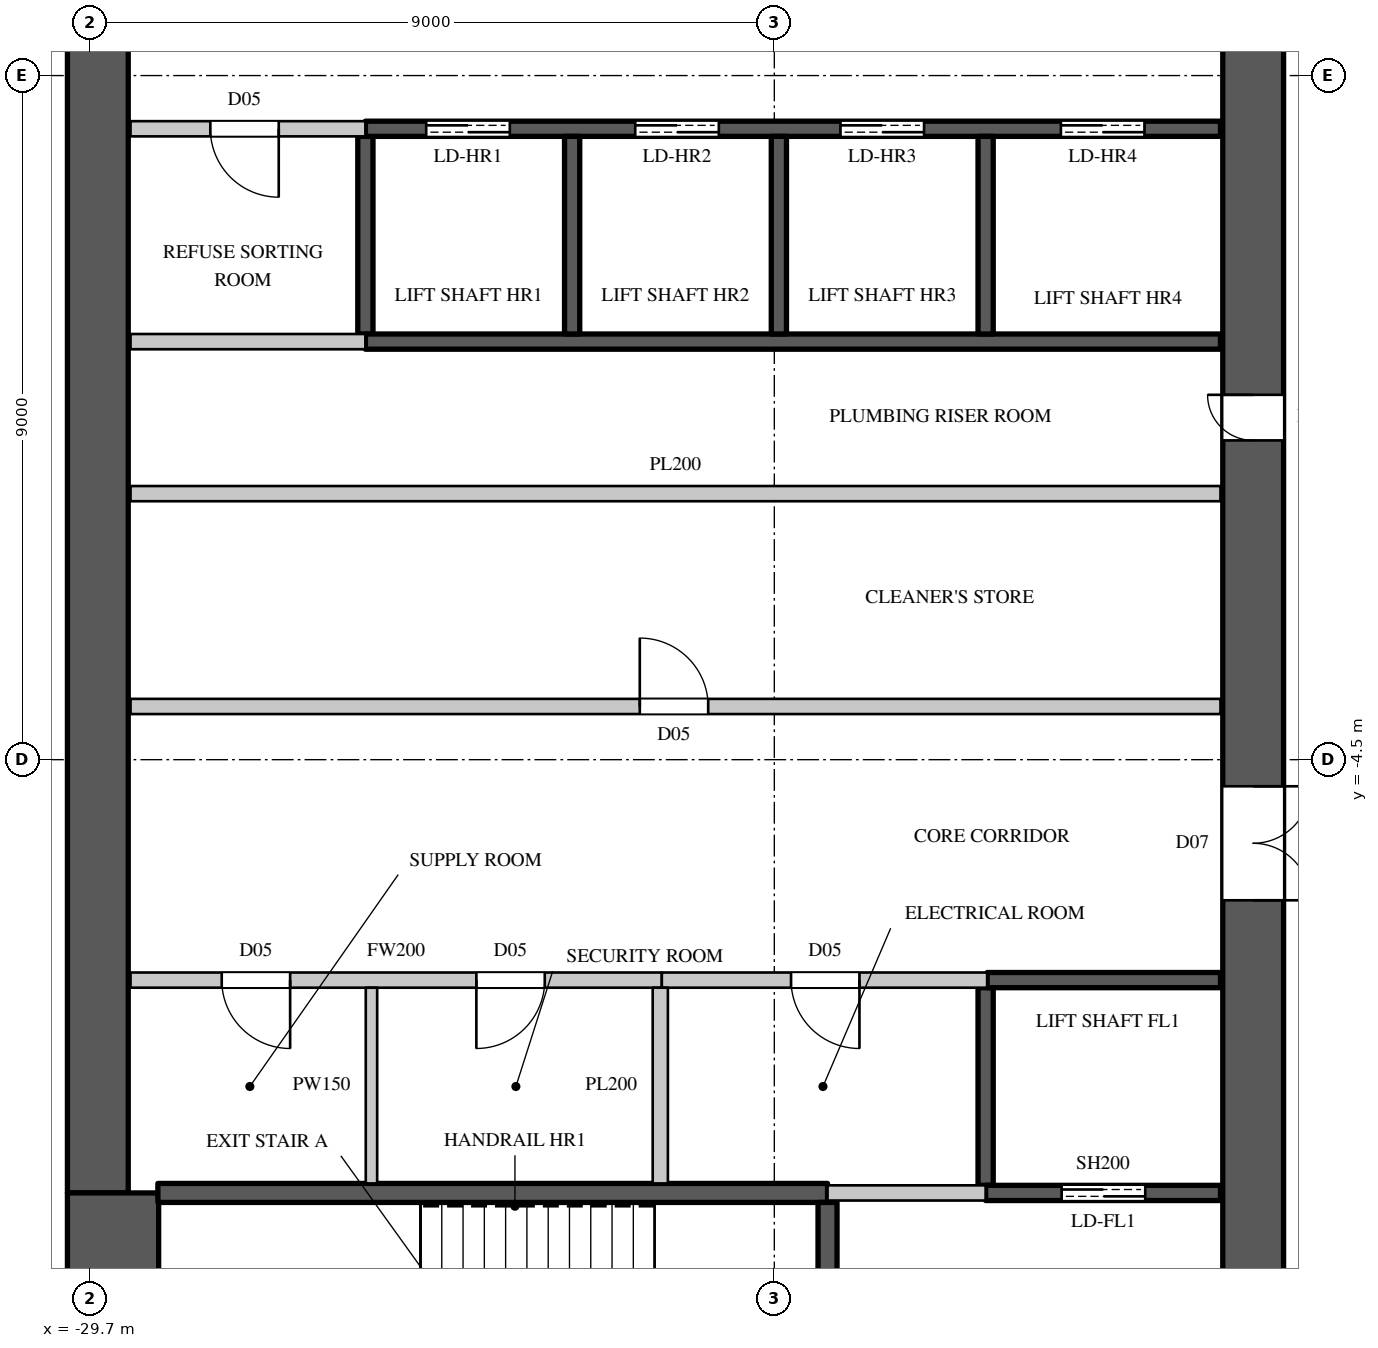
"""IFC4 building model, lengths in metres.
Left out: names, types, materials, properties, quantities, classifications, styles, units other than length and angle.
Written with IfcOpenShell. Run it as: python <this file> out.ifc"""

import sys

from ifc_helpers import new_model, si_unit, direction, frame, frame_2d, origin, place, context, subcontext, project, spatial, rectangle, extrude, element, fill, save


model = new_model("IFC4")
c1 = context("Model", 3, precision=1e-05, world=origin(), true_north=direction((0.0, 1.0)))
c2 = subcontext(c1, "Body", "Model", "MODEL_VIEW")
j1 = project(units=[si_unit("LENGTHUNIT", "METRE"), si_unit("PLANEANGLEUNIT", "RADIAN")], contexts=[c1])
p1 = place(None, origin())
s1 = spatial("IfcSite", under=j1, at=p1, CompositionType="ELEMENT")
p2 = place(p1, origin())
s2 = spatial("IfcBuilding", under=s1, at=p2, CompositionType="ELEMENT")
p3 = place(p2, frame((0.0, 0.0, 176.9)))
s3 = spatial("IfcBuildingStorey", under=s2, at=p3, CompositionType="ELEMENT", Elevation=176.9)
p4 = place(p3, frame((-14.4, -14.8, 0.0), z_axis=(0.0, 0.0, 1.0), x_axis=(0.0, 1.0, 0.0)))
e1 = element("IfcWall", 1, at=p4, inside=s3, PredefinedType="SHEAR", context=c2, shape_type="SweptSolid", body=[
    extrude(rectangle(XDim=29.6, YDim=0.8, at=frame_2d((14.8, 0.0))), origin(), (0.0, 0.0, 1.0), 4.1),
])
p5 = place(p4, frame((1.55, 0.0, 0.0)))
e2 = element("IfcOpeningElement", 2, at=p5, cuts=e1, PredefinedType="OPENING", context=c2, shape_type="SweptSolid", body=[
    extrude(rectangle(XDim=1.5, YDim=2.4, at=frame_2d((0.75, 1.2))), frame((0.0, 0.41, 0.0), z_axis=(0.0, -1.0, 0.0), x_axis=(1.0, 0.0, 0.0)), (0.0, 0.0, 1.0), 0.82),
])
p6 = place(p4, frame((26.55, 0.0, 0.0)))
e3 = element("IfcOpeningElement", 3, at=p6, cuts=e1, PredefinedType="OPENING", context=c2, shape_type="SweptSolid", body=[
    extrude(rectangle(XDim=1.5, YDim=2.4, at=frame_2d((0.75, 1.2))), frame((0.0, 0.41, 0.0), z_axis=(0.0, -1.0, 0.0), x_axis=(1.0, 0.0, 0.0)), (0.0, 0.0, 1.0), 0.82),
])
p7 = place(p4, frame((8.45, 0.0, 0.0)))
e4 = element("IfcOpeningElement", 4, at=p7, cuts=e1, PredefinedType="OPENING", context=c2, shape_type="SweptSolid", body=[
    extrude(rectangle(XDim=1.5, YDim=2.4, at=frame_2d((0.75, 1.2))), frame((0.0, 0.41, 0.0), z_axis=(0.0, -1.0, 0.0), x_axis=(1.0, 0.0, 0.0)), (0.0, 0.0, 1.0), 0.82),
])
p8 = place(p4, frame((19.65, 0.0, 0.0)))
e5 = element("IfcOpeningElement", 5, at=p8, cuts=e1, PredefinedType="OPENING", context=c2, shape_type="SweptSolid", body=[
    extrude(rectangle(XDim=1.5, YDim=2.4, at=frame_2d((0.75, 1.2))), frame((0.0, 0.41, 0.0), z_axis=(0.0, -1.0, 0.0), x_axis=(1.0, 0.0, 0.0)), (0.0, 0.0, 1.0), 0.82),
])
p9 = place(p4, frame((14.5, 0.0, 0.0)))
e6 = element("IfcOpeningElement", 6, at=p9, cuts=e1, PredefinedType="OPENING", context=c2, shape_type="SweptSolid", body=[
    extrude(rectangle(XDim=0.6, YDim=2.0, at=frame_2d((0.3, 1.0))), frame((0.0, 0.41, 0.0), z_axis=(0.0, -1.0, 0.0), x_axis=(1.0, 0.0, 0.0)), (0.0, 0.0, 1.0), 0.82),
])
p10 = place(p3, frame((-29.6, -10.2, 0.0), z_axis=(0.0, 0.0, 1.0), x_axis=(0.0, 1.0, 0.0)))
e7 = element("IfcWall", 7, at=p10, inside=s3, PredefinedType="SHEAR", context=c2, shape_type="SweptSolid", body=[
    extrude(rectangle(XDim=20.4, YDim=0.8, at=frame_2d((10.2, 0.0))), origin(), (0.0, 0.0, 1.0), 4.1),
])
p11 = place(p3, frame((-29.4, -14.8, 0.0), z_axis=(0.0, 0.0, 1.0), x_axis=(0.0, 1.0, 0.0)))
e8 = element("IfcWall", 8, at=p11, inside=s3, PredefinedType="SHEAR", context=c2, shape_type="SweptSolid", body=[
    extrude(rectangle(XDim=4.6, YDim=1.2, at=frame_2d((2.3, 0.0))), origin(), (0.0, 0.0, 1.0), 4.1),
])
p12 = place(p3, frame((-29.17, -7.4, 0.0), z_axis=(0.0, 0.0, 1.0), x_axis=(1.0, 0.0, 0.0)))
e9 = element("IfcWall", 9, at=p12, inside=s3, PredefinedType="PARTITIONING", context=c2, shape_type="SweptSolid", body=[
    extrude(rectangle(XDim=6.99, YDim=0.2, at=frame_2d((3.495, 0.0))), origin(), (0.0, 0.0, 1.0), 3.8),
])
p13 = place(p12, frame((1.2, 0.0, 0.0)))
e10 = element("IfcOpeningElement", 10, at=p13, cuts=e9, PredefinedType="OPENING", context=c2, shape_type="SweptSolid", body=[
    extrude(rectangle(XDim=0.9, YDim=2.2, at=frame_2d((0.45, 1.1))), frame((0.0, 0.11, 0.0), z_axis=(0.0, -1.0, 0.0), x_axis=(1.0, 0.0, 0.0)), (0.0, 0.0, 1.0), 0.22),
])
p14 = place(p12, frame((4.55, 0.0, 0.0)))
e11 = element("IfcOpeningElement", 11, at=p14, cuts=e9, PredefinedType="OPENING", context=c2, shape_type="SweptSolid", body=[
    extrude(rectangle(XDim=0.9, YDim=2.2, at=frame_2d((0.45, 1.1))), frame((0.0, 0.11, 0.0), z_axis=(0.0, -1.0, 0.0), x_axis=(1.0, 0.0, 0.0)), (0.0, 0.0, 1.0), 0.22),
])
p15 = place(p3, frame((-29.17, -3.8, 0.0), z_axis=(0.0, 0.0, 1.0), x_axis=(1.0, 0.0, 0.0)))
e12 = element("IfcWall", 12, at=p15, inside=s3, PredefinedType="PARTITIONING", context=c2, shape_type="SweptSolid", body=[
    extrude(rectangle(XDim=14.34, YDim=0.2, at=frame_2d((7.17, 0.0))), origin(), (0.0, 0.0, 1.0), 3.8),
])
p16 = place(p15, frame((6.7, 0.0, 0.0)))
e13 = element("IfcOpeningElement", 13, at=p16, cuts=e12, PredefinedType="OPENING", context=c2, shape_type="SweptSolid", body=[
    extrude(rectangle(XDim=0.9, YDim=2.2, at=frame_2d((0.45, 1.1))), frame((0.0, 0.11, 0.0), z_axis=(0.0, -1.0, 0.0), x_axis=(1.0, 0.0, 0.0)), (0.0, 0.0, 1.0), 0.22),
])
p17 = place(p3, frame((-29.17, 3.8, 0.0), z_axis=(0.0, 0.0, 1.0), x_axis=(1.0, 0.0, 0.0)))
e14 = element("IfcWall", 14, at=p17, inside=s3, PredefinedType="PARTITIONING", context=c2, shape_type="SweptSolid", body=[
    extrude(rectangle(XDim=3.09, YDim=0.2, at=frame_2d((1.545, 0.0))), origin(), (0.0, 0.0, 1.0), 3.8),
])
p18 = place(p17, frame((1.05, 0.0, 0.0)))
e15 = element("IfcOpeningElement", 15, at=p18, cuts=e14, PredefinedType="OPENING", context=c2, shape_type="SweptSolid", body=[
    extrude(rectangle(XDim=0.9, YDim=2.2, at=frame_2d((0.45, 1.1))), frame((0.0, 0.11, 0.0), z_axis=(0.0, -1.0, 0.0), x_axis=(1.0, 0.0, 0.0)), (0.0, 0.0, 1.0), 0.22),
])
p19 = place(p3, frame((-26.0, -10.075, 0.0), z_axis=(0.0, 0.0, 1.0), x_axis=(0.0, 1.0, 0.0)))
e16 = element("IfcWall", 16, at=p19, inside=s3, PredefinedType="PARTITIONING", context=c2, shape_type="SweptSolid", body=[
    extrude(rectangle(XDim=2.575, YDim=0.15, at=frame_2d((1.288, 0.0))), origin(), (0.0, 0.0, 1.0), 3.8),
])
p20 = place(p3, frame((-29.17, -1.0, 0.0), z_axis=(0.0, 0.0, 1.0), x_axis=(1.0, 0.0, 0.0)))
e17 = element("IfcWall", 17, at=p20, inside=s3, PredefinedType="PARTITIONING", context=c2, shape_type="SweptSolid", body=[
    extrude(rectangle(XDim=14.34, YDim=0.2, at=frame_2d((7.17, 0.0))), origin(), (0.0, 0.0, 1.0), 3.8),
])
p21 = place(p3, frame((-29.17, 1.0, 0.0), z_axis=(0.0, 0.0, 1.0), x_axis=(1.0, 0.0, 0.0)))
e18 = element("IfcWall", 18, at=p21, inside=s3, PredefinedType="PARTITIONING", context=c2, shape_type="SweptSolid", body=[
    extrude(rectangle(XDim=3.09, YDim=0.2, at=frame_2d((1.545, 0.0))), origin(), (0.0, 0.0, 1.0), 3.8),
])
p22 = place(p3, frame((-22.18, -7.4, 0.0), z_axis=(0.0, 0.0, 1.0), x_axis=(1.0, 0.0, 0.0)))
e19 = element("IfcWall", 19, at=p22, inside=s3, PredefinedType="PARTITIONING", context=c2, shape_type="SweptSolid", body=[
    extrude(rectangle(XDim=4.28, YDim=0.2, at=frame_2d((2.14, 0.0))), origin(), (0.0, 0.0, 1.0), 3.8),
])
p23 = place(p22, frame((1.7, 0.0, 0.0)))
e20 = element("IfcOpeningElement", 20, at=p23, cuts=e19, PredefinedType="OPENING", context=c2, shape_type="SweptSolid", body=[
    extrude(rectangle(XDim=0.9, YDim=2.2, at=frame_2d((0.45, 1.1))), frame((0.0, 0.11, 0.0), z_axis=(0.0, -1.0, 0.0), x_axis=(1.0, 0.0, 0.0)), (0.0, 0.0, 1.0), 0.22),
])
p24 = place(p3, frame((-22.2, -10.075, 0.0), z_axis=(0.0, 0.0, 1.0), x_axis=(0.0, 1.0, 0.0)))
e21 = element("IfcWall", 21, at=p24, inside=s3, PredefinedType="PARTITIONING", context=c2, shape_type="SweptSolid", body=[
    extrude(rectangle(XDim=2.575, YDim=0.2, at=frame_2d((1.288, 0.0))), origin(), (0.0, 0.0, 1.0), 3.8),
])
p25 = place(p3, frame((-20.0, -10.2, 0.0), z_axis=(0.0, 0.0, 1.0), x_axis=(1.0, 0.0, 0.0)))
e22 = element("IfcWall", 22, at=p25, inside=s3, PredefinedType="PARTITIONING", context=c2, shape_type="SweptSolid", body=[
    extrude(rectangle(XDim=2.08, YDim=0.2, at=frame_2d((1.04, 0.0))), origin(), (0.0, 0.0, 1.0), 3.8),
])
p26 = place(p3, frame((-26.08, 1.1, 0.0), z_axis=(0.0, 0.0, 1.0), x_axis=(0.0, 1.0, 0.0)))
e23 = element("IfcWall", 23, at=p26, inside=s3, PredefinedType="SHEAR", context=c2, shape_type="SweptSolid", body=[
    extrude(rectangle(XDim=2.6, YDim=0.2, at=frame_2d((1.3, 0.0))), origin(), (0.0, 0.0, 1.0), 3.8),
])
p27 = place(p3, frame((-26.08, 1.0, 0.0), z_axis=(0.0, 0.0, 1.0), x_axis=(1.0, 0.0, 0.0)))
e24 = element("IfcWall", 24, at=p27, inside=s3, PredefinedType="SHEAR", context=c2, shape_type="SweptSolid", body=[
    extrude(rectangle(XDim=11.25, YDim=0.2, at=frame_2d((5.625, 0.0))), origin(), (0.0, 0.0, 1.0), 3.8),
])
p28 = place(p3, frame((-26.08, 3.8, 0.0), z_axis=(0.0, 0.0, 1.0), x_axis=(1.0, 0.0, 0.0)))
e25 = element("IfcWall", 25, at=p28, inside=s3, PredefinedType="SHEAR", context=c2, shape_type="SweptSolid", body=[
    extrude(rectangle(XDim=11.25, YDim=0.2, at=frame_2d((5.625, 0.0))), origin(), (0.0, 0.0, 1.0), 3.8),
])
p29 = place(p28, frame((0.8, 0.0, 0.0)))
e26 = element("IfcOpeningElement", 26, at=p29, cuts=e25, PredefinedType="OPENING", context=c2, shape_type="SweptSolid", body=[
    extrude(rectangle(XDim=1.1, YDim=2.2, at=frame_2d((0.55, 1.1))), frame((0.0, 0.11, 0.0), z_axis=(0.0, -1.0, 0.0), x_axis=(1.0, 0.0, 0.0)), (0.0, 0.0, 1.0), 0.22),
])
p30 = place(p28, frame((3.55, 0.0, 0.0)))
e27 = element("IfcOpeningElement", 27, at=p30, cuts=e25, PredefinedType="OPENING", context=c2, shape_type="SweptSolid", body=[
    extrude(rectangle(XDim=1.1, YDim=2.2, at=frame_2d((0.55, 1.1))), frame((0.0, 0.11, 0.0), z_axis=(0.0, -1.0, 0.0), x_axis=(1.0, 0.0, 0.0)), (0.0, 0.0, 1.0), 0.22),
])
p31 = place(p28, frame((6.25, 0.0, 0.0)))
e28 = element("IfcOpeningElement", 28, at=p31, cuts=e25, PredefinedType="OPENING", context=c2, shape_type="SweptSolid", body=[
    extrude(rectangle(XDim=1.1, YDim=2.2, at=frame_2d((0.55, 1.1))), frame((0.0, 0.11, 0.0), z_axis=(0.0, -1.0, 0.0), x_axis=(1.0, 0.0, 0.0)), (0.0, 0.0, 1.0), 0.22),
])
p32 = place(p28, frame((9.15, 0.0, 0.0)))
e29 = element("IfcOpeningElement", 29, at=p32, cuts=e25, PredefinedType="OPENING", context=c2, shape_type="SweptSolid", body=[
    extrude(rectangle(XDim=1.1, YDim=2.2, at=frame_2d((0.55, 1.1))), frame((0.0, 0.11, 0.0), z_axis=(0.0, -1.0, 0.0), x_axis=(1.0, 0.0, 0.0)), (0.0, 0.0, 1.0), 0.22),
])
for number, where, z_axis, x_axis in (
    (30, (-23.36, 1.1, 0.0), (0.0, 0.0, 1.0), (0.0, 1.0, 0.0)),
    (31, (-20.64, 1.1, 0.0), (0.0, 0.0, 1.0), (0.0, 1.0, 0.0)),
):
    element("IfcWall", number, at=place(p3, frame(where, z_axis=z_axis, x_axis=x_axis)), inside=s3, PredefinedType="SHEAR", context=c2, shape_type="SweptSolid", body=[
        extrude(rectangle(XDim=2.6, YDim=0.2, at=frame_2d((1.3, 0.0))), origin(), (0.0, 0.0, 1.0), 4.1),
    ])
p33 = place(p3, frame((-17.92, -10.1, 0.0), z_axis=(0.0, 0.0, 1.0), x_axis=(0.0, 1.0, 0.0)))
e32 = element("IfcWall", 32, at=p33, inside=s3, PredefinedType="SHEAR", context=c2, shape_type="SweptSolid", body=[
    extrude(rectangle(XDim=2.6, YDim=0.2, at=frame_2d((1.3, 0.0))), origin(), (0.0, 0.0, 1.0), 3.8),
])
p34 = place(p3, frame((-17.92, -10.2, 0.0), z_axis=(0.0, 0.0, 1.0), x_axis=(1.0, 0.0, 0.0)))
e33 = element("IfcWall", 33, at=p34, inside=s3, PredefinedType="SHEAR", context=c2, shape_type="SweptSolid", body=[
    extrude(rectangle(XDim=3.09, YDim=0.2, at=frame_2d((1.545, 0.0))), origin(), (0.0, 0.0, 1.0), 3.8),
])
p35 = place(p34, frame((1.0, 0.0, 0.0)))
e34 = element("IfcOpeningElement", 34, at=p35, cuts=e33, PredefinedType="OPENING", context=c2, shape_type="SweptSolid", body=[
    extrude(rectangle(XDim=1.1, YDim=2.2, at=frame_2d((0.55, 1.1))), frame((0.0, 0.11, 0.0), z_axis=(0.0, -1.0, 0.0), x_axis=(1.0, 0.0, 0.0)), (0.0, 0.0, 1.0), 0.22),
])
p36 = place(p3, frame((-17.9, -7.4, 0.0), z_axis=(0.0, 0.0, 1.0), x_axis=(1.0, 0.0, 0.0)))
e35 = element("IfcWall", 35, at=p36, inside=s3, PredefinedType="SHEAR", context=c2, shape_type="SweptSolid", body=[
    extrude(rectangle(XDim=3.07, YDim=0.2, at=frame_2d((1.535, 0.0))), origin(), (0.0, 0.0, 1.0), 3.8),
])
p37 = place(p3, frame((-17.92, 1.1, 0.0), z_axis=(0.0, 0.0, 1.0), x_axis=(0.0, 1.0, 0.0)))
e36 = element("IfcWall", 36, at=p37, inside=s3, PredefinedType="SHEAR", context=c2, shape_type="SweptSolid", body=[
    extrude(rectangle(XDim=2.6, YDim=0.2, at=frame_2d((1.3, 0.0))), origin(), (0.0, 0.0, 1.0), 4.1),
])
p38 = place(p3, frame((-28.81, -10.2, 0.0), z_axis=(0.0, 0.0, 1.0), x_axis=(1.0, 0.0, 0.0)))
e37 = element("IfcWall", 37, at=p38, inside=s3, PredefinedType="SHEAR", context=c2, shape_type="SweptSolid", body=[
    extrude(rectangle(XDim=8.81, YDim=0.25, at=frame_2d((4.405, 0.0))), origin(), (0.0, 0.0, 1.0), 3.8),
])
p39 = place(p3, frame((-20.0, -14.77, 0.0), z_axis=(0.0, 0.0, 1.0), x_axis=(0.0, 1.0, 0.0)))
e38 = element("IfcWall", 38, at=p39, inside=s3, PredefinedType="SHEAR", context=c2, shape_type="SweptSolid", body=[
    extrude(rectangle(XDim=4.445, YDim=0.25, at=frame_2d((2.223, 0.0))), origin(), (0.0, 0.0, 1.0), 3.8),
])
p40 = place(p39, frame((1.7, 0.0, 0.0)))
e39 = element("IfcOpeningElement", 39, at=p40, cuts=e38, PredefinedType="OPENING", context=c2, shape_type="SweptSolid", body=[
    extrude(rectangle(XDim=1.1, YDim=2.2, at=frame_2d((0.55, 1.1))), frame((0.0, 0.135, 0.0), z_axis=(0.0, -1.0, 0.0), x_axis=(1.0, 0.0, 0.0)), (0.0, 0.0, 1.0), 0.27),
])
p41 = place(p13, origin())
e40 = element("IfcDoor", 40, at=p41, inside=s3, OperationType="SINGLE_SWING_LEFT", PredefinedType="DOOR", context=c2, shape_type="SweptSolid", body=[
    extrude(rectangle(XDim=0.9, YDim=2.2, at=frame_2d((0.45, 1.1))), frame((0.0, 0.025, 0.0), z_axis=(0.0, -1.0, 0.0), x_axis=(1.0, 0.0, 0.0)), (0.0, 0.0, 1.0), 0.05),
])
fill(e10, e40)
p42 = place(p14, origin())
e41 = element("IfcDoor", 41, at=p42, inside=s3, OperationType="SINGLE_SWING_RIGHT", PredefinedType="DOOR", context=c2, shape_type="SweptSolid", body=[
    extrude(rectangle(XDim=0.9, YDim=2.2, at=frame_2d((0.45, 1.1))), frame((0.0, 0.025, 0.0), z_axis=(0.0, -1.0, 0.0), x_axis=(1.0, 0.0, 0.0)), (0.0, 0.0, 1.0), 0.05),
])
fill(e11, e41)
p43 = place(p23, origin())
e42 = element("IfcDoor", 42, at=p43, inside=s3, OperationType="SINGLE_SWING_LEFT", PredefinedType="DOOR", context=c2, shape_type="SweptSolid", body=[
    extrude(rectangle(XDim=0.9, YDim=2.2, at=frame_2d((0.45, 1.1))), frame((0.0, 0.025, 0.0), z_axis=(0.0, -1.0, 0.0), x_axis=(1.0, 0.0, 0.0)), (0.0, 0.0, 1.0), 0.05),
])
fill(e20, e42)
p44 = place(p16, origin())
e43 = element("IfcDoor", 43, at=p44, inside=s3, OperationType="SINGLE_SWING_LEFT", PredefinedType="DOOR", context=c2, shape_type="SweptSolid", body=[
    extrude(rectangle(XDim=0.9, YDim=2.2, at=frame_2d((0.45, 1.1))), frame((0.0, 0.025, 0.0), z_axis=(0.0, -1.0, 0.0), x_axis=(1.0, 0.0, 0.0)), (0.0, 0.0, 1.0), 0.05),
])
fill(e13, e43)
p45 = place(p18, origin())
e44 = element("IfcDoor", 44, at=p45, inside=s3, OperationType="SINGLE_SWING_LEFT", PredefinedType="DOOR", context=c2, shape_type="SweptSolid", body=[
    extrude(rectangle(XDim=0.9, YDim=2.2, at=frame_2d((0.45, 1.1))), frame((0.0, 0.025, 0.0), z_axis=(0.0, -1.0, 0.0), x_axis=(1.0, 0.0, 0.0)), (0.0, 0.0, 1.0), 0.05),
])
fill(e15, e44)
p46 = place(p35, origin())
e45 = element("IfcDoor", 45, at=p46, inside=s3, OperationType="DOUBLE_DOOR_SLIDING", PredefinedType="DOOR", context=c2, shape_type="SweptSolid", body=[
    extrude(rectangle(XDim=1.1, YDim=2.2, at=frame_2d((0.55, 1.1))), frame((0.0, 0.025, 0.0), z_axis=(0.0, -1.0, 0.0), x_axis=(1.0, 0.0, 0.0)), (0.0, 0.0, 1.0), 0.05),
])
fill(e34, e45)
p47 = place(p29, origin())
e46 = element("IfcDoor", 46, at=p47, inside=s3, OperationType="DOUBLE_DOOR_SLIDING", PredefinedType="DOOR", context=c2, shape_type="SweptSolid", body=[
    extrude(rectangle(XDim=1.1, YDim=2.2, at=frame_2d((0.55, 1.1))), frame((0.0, 0.025, 0.0), z_axis=(0.0, -1.0, 0.0), x_axis=(1.0, 0.0, 0.0)), (0.0, 0.0, 1.0), 0.05),
])
fill(e26, e46)
p48 = place(p30, origin())
e47 = element("IfcDoor", 47, at=p48, inside=s3, OperationType="DOUBLE_DOOR_SLIDING", PredefinedType="DOOR", context=c2, shape_type="SweptSolid", body=[
    extrude(rectangle(XDim=1.1, YDim=2.2, at=frame_2d((0.55, 1.1))), frame((0.0, 0.025, 0.0), z_axis=(0.0, -1.0, 0.0), x_axis=(1.0, 0.0, 0.0)), (0.0, 0.0, 1.0), 0.05),
])
fill(e27, e47)
p49 = place(p31, origin())
e48 = element("IfcDoor", 48, at=p49, inside=s3, OperationType="DOUBLE_DOOR_SLIDING", PredefinedType="DOOR", context=c2, shape_type="SweptSolid", body=[
    extrude(rectangle(XDim=1.1, YDim=2.2, at=frame_2d((0.55, 1.1))), frame((0.0, 0.025, 0.0), z_axis=(0.0, -1.0, 0.0), x_axis=(1.0, 0.0, 0.0)), (0.0, 0.0, 1.0), 0.05),
])
fill(e28, e48)
p50 = place(p32, origin())
e49 = element("IfcDoor", 49, at=p50, inside=s3, OperationType="DOUBLE_DOOR_SLIDING", PredefinedType="DOOR", context=c2, shape_type="SweptSolid", body=[
    extrude(rectangle(XDim=1.1, YDim=2.2, at=frame_2d((0.55, 1.1))), frame((0.0, 0.025, 0.0), z_axis=(0.0, -1.0, 0.0), x_axis=(1.0, 0.0, 0.0)), (0.0, 0.0, 1.0), 0.05),
])
fill(e29, e49)
p51 = place(p7, origin())
e50 = element("IfcDoor", 50, at=p51, inside=s3, OperationType="DOUBLE_DOOR_SINGLE_SWING", PredefinedType="DOOR", context=c2, shape_type="SweptSolid", body=[
    extrude(rectangle(XDim=1.5, YDim=2.4, at=frame_2d((0.75, 1.2))), frame((0.0, -0.345, 0.0), z_axis=(0.0, -1.0, 0.0), x_axis=(1.0, 0.0, 0.0)), (0.0, 0.0, 1.0), 0.05),
])
fill(e4, e50)
p52 = place(p9, origin())
e51 = element("IfcDoor", 51, at=p52, inside=s3, OperationType="SINGLE_SWING_RIGHT", PredefinedType="DOOR", context=c2, shape_type="SweptSolid", body=[
    extrude(rectangle(XDim=0.6, YDim=2.0, at=frame_2d((0.3, 1.0))), frame((0.0, 0.395, 0.0), z_axis=(0.0, -1.0, 0.0), x_axis=(1.0, 0.0, 0.0)), (0.0, 0.0, 1.0), 0.05),
])
fill(e6, e51)
save(model, sys.argv[1])
